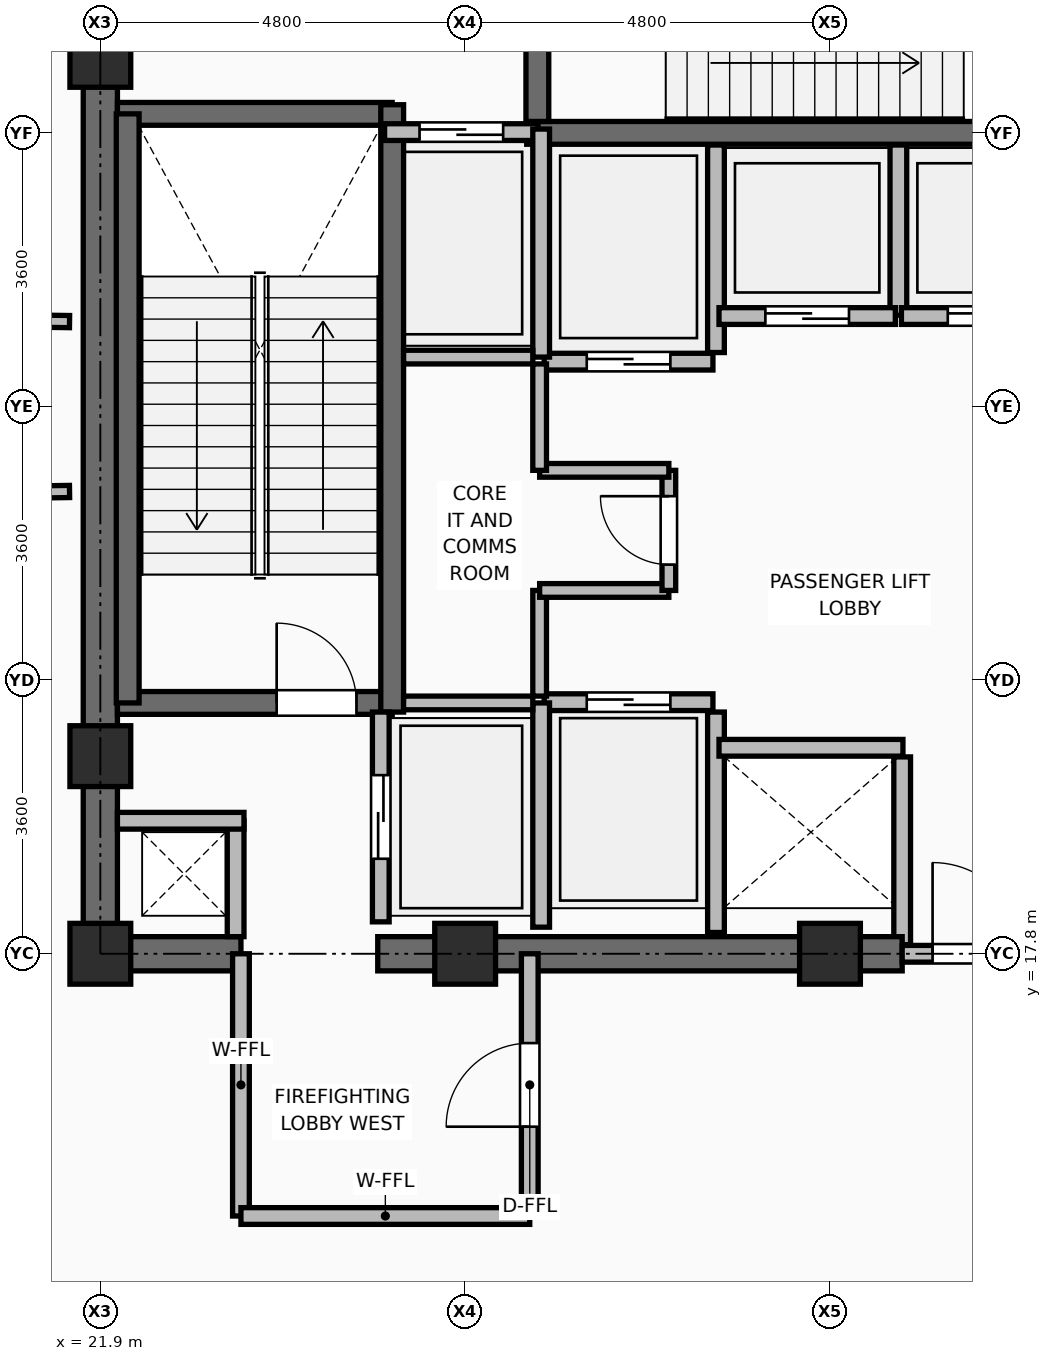
"""IFC4 building model, lengths in metres.
Left out: names, types, materials, properties, quantities, classifications, styles, units other than length and angle.
Written with IfcOpenShell. Run it as: python <this file> out.ifc"""

import sys

from ifc_helpers import new_model, si_unit, direction, frame, frame_2d, origin, origin_2d, place, context, subcontext, project, spatial, rectangle, extrude, element, fill, save


model = new_model("IFC4")
c1 = context("Model", 3, precision=1e-05, world=origin(), true_north=direction((0.0, 1.0)))
c2 = subcontext(c1, "Body", "Model", "MODEL_VIEW")
j1 = project(units=[si_unit("LENGTHUNIT", "METRE"), si_unit("PLANEANGLEUNIT", "RADIAN")], contexts=[c1])
p1 = place(None, origin())
s1 = spatial("IfcSite", under=j1, at=p1, CompositionType="ELEMENT")
p2 = place(p1, origin())
s2 = spatial("IfcBuilding", under=s1, at=p2, CompositionType="ELEMENT")
p3 = place(p2, frame((0.0, 0.0, 253.65)))
s3 = spatial("IfcBuildingStorey", under=s2, at=p3, CompositionType="ELEMENT", Elevation=253.65)
for number, where, z_axis, x_axis in (
    (1, (21.9, 17.8, 0.0), (0.0, 0.0, 1.0), (1.0, 0.0, 0.0)),
    (2, (26.7, 17.8, 0.0), (0.0, 0.0, 1.0), (1.0, 0.0, 0.0)),
    (3, (31.5, 17.8, 0.0), (0.0, 0.0, 1.0), (1.0, 0.0, 0.0)),
    (4, (21.9, 20.4, 0.0), (0.0, 0.0, 1.0), (1.0, 0.0, 0.0)),
    (5, (21.9, 29.6, 0.0), (0.0, 0.0, 1.0), (1.0, 0.0, 0.0)),
):
    element("IfcColumn", number, at=place(p3, frame(where, z_axis=z_axis, x_axis=x_axis)), inside=s3, PredefinedType="COLUMN", context=c2, shape_type="SweptSolid", body=[
        extrude(rectangle(XDim=0.8, YDim=0.8, at=origin_2d()), origin(), (0.0, 0.0, 1.0), 5.4),
    ])
p4 = place(p3, frame((30.0, 18.08, 0.0), z_axis=(0.0, 0.0, 1.0), x_axis=(0.0, 1.0, 0.0)))
e6 = element("IfcWall", 6, at=p4, inside=s3, PredefinedType="PARTITIONING", context=c2, shape_type="SweptSolid", body=[
    extrude(rectangle(XDim=2.9, YDim=0.22, at=frame_2d((1.45, 0.0))), origin(), (0.0, 0.0, 1.0), 5.195),
])
p5 = place(p3, frame((32.45, 17.92, 0.0), z_axis=(0.0, 0.0, 1.0), x_axis=(0.0, 1.0, 0.0)))
e7 = element("IfcWall", 7, at=p5, inside=s3, PredefinedType="PARTITIONING", context=c2, shape_type="SweptSolid", body=[
    extrude(rectangle(XDim=2.47, YDim=0.22, at=frame_2d((1.235, 0.0))), origin(), (0.0, 0.0, 1.0), 5.195),
])
p6 = place(p3, frame((30.0, 25.71, 0.0), z_axis=(0.0, 0.0, 1.0), x_axis=(0.0, 1.0, 0.0)))
e8 = element("IfcWall", 8, at=p6, inside=s3, PredefinedType="PARTITIONING", context=c2, shape_type="SweptSolid", body=[
    extrude(rectangle(XDim=2.73, YDim=0.22, at=frame_2d((1.365, 0.0))), origin(), (0.0, 0.0, 1.0), 5.195),
])
p7 = place(p3, frame((32.4, 26.2, 0.0), z_axis=(0.0, 0.0, 1.0), x_axis=(0.0, 1.0, 0.0)))
e9 = element("IfcWall", 9, at=p7, inside=s3, PredefinedType="PARTITIONING", context=c2, shape_type="SweptSolid", body=[
    extrude(rectangle(XDim=2.24, YDim=0.22, at=frame_2d((1.12, 0.0))), origin(), (0.0, 0.0, 1.0), 5.195),
])
p8 = place(p3, frame((21.675, 17.8, 0.0), z_axis=(0.0, 0.0, 1.0), x_axis=(1.0, 0.0, 0.0)))
e10 = element("IfcWall", 10, at=p8, inside=s3, PredefinedType="SHEAR", context=c2, shape_type="SweptSolid", body=[
    extrude(rectangle(XDim=2.075, YDim=0.45, at=frame_2d((1.038, 0.0))), origin(), (0.0, 0.0, 1.0), 5.22),
])
p9 = place(p3, frame((25.55, 17.8, 0.0), z_axis=(0.0, 0.0, 1.0), x_axis=(1.0, 0.0, 0.0)))
e11 = element("IfcWall", 11, at=p9, inside=s3, PredefinedType="SHEAR", context=c2, shape_type="SweptSolid", body=[
    extrude(rectangle(XDim=6.9, YDim=0.45, at=frame_2d((3.45, 0.0))), origin(), (0.0, 0.0, 1.0), 5.22),
])
p10 = place(p3, frame((32.45, 17.8, 0.0), z_axis=(0.0, 0.0, 1.0), x_axis=(1.0, 0.0, 0.0)))
e12 = element("IfcWall", 12, at=p10, inside=s3, PredefinedType="PARTITIONING", context=c2, shape_type="SweptSolid", body=[
    extrude(rectangle(XDim=2.5, YDim=0.22, at=frame_2d((1.25, 0.0))), origin(), (0.0, 0.0, 1.0), 4.733),
])
p11 = place(p10, frame((0.4, 0.0, 0.0)))
e13 = element("IfcOpeningElement", 13, at=p11, cuts=e12, PredefinedType="OPENING", context=c2, shape_type="SweptSolid", body=[
    extrude(rectangle(XDim=1.2, YDim=2.1, at=frame_2d((0.6, 1.05))), frame((0.0, 0.12, 0.0), z_axis=(0.0, -1.0, 0.0), x_axis=(1.0, 0.0, 0.0)), (0.0, 0.0, 1.0), 0.24),
])
p12 = place(p3, frame((21.9, 18.025, 0.0), z_axis=(0.0, 0.0, 1.0), x_axis=(0.0, 1.0, 0.0)))
e14 = element("IfcWall", 14, at=p12, inside=s3, PredefinedType="SHEAR", context=c2, shape_type="SweptSolid", body=[
    extrude(rectangle(XDim=14.2, YDim=0.45, at=frame_2d((7.1, 0.0))), origin(), (0.0, 0.0, 1.0), 5.22),
])
p13 = place(p3, frame((22.125, 21.1, 0.0), z_axis=(0.0, 0.0, 1.0), x_axis=(1.0, 0.0, 0.0)))
e15 = element("IfcWall", 15, at=p13, inside=s3, PredefinedType="SHEAR", context=c2, shape_type="SweptSolid", body=[
    extrude(rectangle(XDim=3.615, YDim=0.3, at=frame_2d((1.808, 0.0))), origin(), (0.0, 0.0, 1.0), 5.22),
])
p14 = place(p13, frame((2.095, 0.0, 0.0)))
e16 = element("IfcOpeningElement", 16, at=p14, cuts=e15, PredefinedType="OPENING", context=c2, shape_type="SweptSolid", body=[
    extrude(rectangle(XDim=1.05, YDim=2.1, at=frame_2d((0.525, 1.05))), frame((0.0, 0.16, 0.0), z_axis=(0.0, -1.0, 0.0), x_axis=(1.0, 0.0, 0.0)), (0.0, 0.0, 1.0), 0.32),
])
p15 = place(p3, frame((22.125, 28.85, 0.0), z_axis=(0.0, 0.0, 1.0), x_axis=(1.0, 0.0, 0.0)))
e17 = element("IfcWall", 17, at=p15, inside=s3, PredefinedType="SHEAR", context=c2, shape_type="SweptSolid", body=[
    extrude(rectangle(XDim=3.615, YDim=0.3, at=frame_2d((1.808, 0.0))), origin(), (0.0, 0.0, 1.0), 5.22),
])
p16 = place(p3, frame((25.74, 20.98, 0.0), z_axis=(0.0, 0.0, 1.0), x_axis=(0.0, 1.0, 0.0)))
e18 = element("IfcWall", 18, at=p16, inside=s3, PredefinedType="SHEAR", context=c2, shape_type="SweptSolid", body=[
    extrude(rectangle(XDim=7.99, YDim=0.3, at=frame_2d((3.995, 0.0))), origin(), (0.0, 0.0, 1.0), 5.22),
])
p17 = place(p3, frame((22.26, 21.1, 0.0), z_axis=(0.0, 0.0, 1.0), x_axis=(0.0, 1.0, 0.0)))
e19 = element("IfcWall", 19, at=p17, inside=s3, PredefinedType="SHEAR", context=c2, shape_type="SweptSolid", body=[
    extrude(rectangle(XDim=7.75, YDim=0.3, at=frame_2d((3.875, 0.0))), origin(), (0.0, 0.0, 1.0), 5.22),
])
p18 = place(p3, frame((27.51, 28.6, 0.0), z_axis=(0.0, 0.0, 1.0), x_axis=(1.0, 0.0, 0.0)))
e20 = element("IfcWall", 20, at=p18, inside=s3, PredefinedType="SHEAR", context=c2, shape_type="SweptSolid", body=[
    extrude(rectangle(XDim=8.03, YDim=0.3, at=frame_2d((4.015, 0.0))), origin(), (0.0, 0.0, 1.0), 5.22),
])
p19 = place(p3, frame((27.65, 28.75, 0.0), z_axis=(0.0, 0.0, 1.0), x_axis=(0.0, 1.0, 0.0)))
e21 = element("IfcWall", 21, at=p19, inside=s3, PredefinedType="SHEAR", context=c2, shape_type="SweptSolid", body=[
    extrude(rectangle(XDim=3.475, YDim=0.3, at=frame_2d((1.738, 0.0))), origin(), (0.0, 0.0, 1.0), 5.22),
])
p20 = place(p19, frame((1.0, 0.0, 0.0)))
e22 = element("IfcOpeningElement", 22, at=p20, cuts=e21, PredefinedType="OPENING", context=c2, shape_type="SweptSolid", body=[
    extrude(rectangle(XDim=1.05, YDim=2.1, at=frame_2d((0.525, 1.05))), frame((0.0, 0.16, 0.0), z_axis=(0.0, -1.0, 0.0), x_axis=(1.0, 0.0, 0.0)), (0.0, 0.0, 1.0), 0.32),
])
p21 = place(p3, frame((23.68, 18.025, 0.0), z_axis=(0.0, 0.0, 1.0), x_axis=(0.0, 1.0, 0.0)))
e23 = element("IfcWall", 23, at=p21, inside=s3, PredefinedType="PARTITIONING", context=c2, shape_type="SweptSolid", body=[
    extrude(rectangle(XDim=1.525, YDim=0.22, at=frame_2d((0.763, 0.0))), origin(), (0.0, 0.0, 1.0), 5.2),
])
p22 = place(p3, frame((22.125, 19.55, 0.0), z_axis=(0.0, 0.0, 1.0), x_axis=(1.0, 0.0, 0.0)))
e24 = element("IfcWall", 24, at=p22, inside=s3, PredefinedType="PARTITIONING", context=c2, shape_type="SweptSolid", body=[
    extrude(rectangle(XDim=1.665, YDim=0.22, at=frame_2d((0.833, 0.0))), origin(), (0.0, 0.0, 1.0), 4.245),
])
p23 = place(p3, frame((25.59, 18.22, 0.0), z_axis=(0.0, 0.0, 1.0), x_axis=(0.0, 1.0, 0.0)))
e25 = element("IfcWall", 25, at=p23, inside=s3, PredefinedType="PARTITIONING", context=c2, shape_type="SweptSolid", body=[
    extrude(rectangle(XDim=2.76, YDim=0.22, at=frame_2d((1.38, 0.0))), origin(), (0.0, 0.0, 1.0), 5.2),
])
p24 = place(p23, frame((0.83, 0.0, 0.0)))
e26 = element("IfcOpeningElement", 26, at=p24, cuts=e25, PredefinedType="OPENING", context=c2, shape_type="SweptSolid", body=[
    extrude(rectangle(XDim=1.1, YDim=2.2, at=frame_2d((0.55, 1.1))), frame((0.0, 0.12, 0.0), z_axis=(0.0, -1.0, 0.0), x_axis=(1.0, 0.0, 0.0)), (0.0, 0.0, 1.0), 0.24),
])
p25 = place(p3, frame((25.64, 28.61, 0.0), z_axis=(0.0, 0.0, 1.0), x_axis=(1.0, 0.0, 0.0)))
e27 = element("IfcWall", 27, at=p25, inside=s3, PredefinedType="PARTITIONING", context=c2, shape_type="SweptSolid", body=[
    extrude(rectangle(XDim=2.02, YDim=0.22, at=frame_2d((1.01, 0.0))), origin(), (0.0, 0.0, 1.0), 5.2),
])
p26 = place(p25, frame((0.46, 0.0, 0.0)))
e28 = element("IfcOpeningElement", 28, at=p26, cuts=e27, PredefinedType="OPENING", context=c2, shape_type="SweptSolid", body=[
    extrude(rectangle(XDim=1.1, YDim=2.2, at=frame_2d((0.55, 1.1))), frame((0.0, 0.12, 0.0), z_axis=(0.0, -1.0, 0.0), x_axis=(1.0, 0.0, 0.0)), (0.0, 0.0, 1.0), 0.24),
])
p27 = place(p3, frame((27.74, 21.11, 0.0), z_axis=(0.0, 0.0, 1.0), x_axis=(1.0, 0.0, 0.0)))
e29 = element("IfcWall", 29, at=p27, inside=s3, PredefinedType="PARTITIONING", context=c2, shape_type="SweptSolid", body=[
    extrude(rectangle(XDim=2.22, YDim=0.22, at=frame_2d((1.11, 0.0))), origin(), (0.0, 0.0, 1.0), 5.2),
])
p28 = place(p27, frame((0.56, 0.0, 0.0)))
e30 = element("IfcOpeningElement", 30, at=p28, cuts=e29, PredefinedType="OPENING", context=c2, shape_type="SweptSolid", body=[
    extrude(rectangle(XDim=1.1, YDim=2.2, at=frame_2d((0.55, 1.1))), frame((0.0, 0.12, 0.0), z_axis=(0.0, -1.0, 0.0), x_axis=(1.0, 0.0, 0.0)), (0.0, 0.0, 1.0), 0.24),
])
p29 = place(p3, frame((27.74, 25.59, 0.0), z_axis=(0.0, 0.0, 1.0), x_axis=(1.0, 0.0, 0.0)))
e31 = element("IfcWall", 31, at=p29, inside=s3, PredefinedType="PARTITIONING", context=c2, shape_type="SweptSolid", body=[
    extrude(rectangle(XDim=2.22, YDim=0.22, at=frame_2d((1.11, 0.0))), origin(), (0.0, 0.0, 1.0), 5.2),
])
p30 = place(p29, frame((0.56, 0.0, 0.0)))
e32 = element("IfcOpeningElement", 32, at=p30, cuts=e31, PredefinedType="OPENING", context=c2, shape_type="SweptSolid", body=[
    extrude(rectangle(XDim=1.1, YDim=2.2, at=frame_2d((0.55, 1.1))), frame((0.0, 0.12, 0.0), z_axis=(0.0, -1.0, 0.0), x_axis=(1.0, 0.0, 0.0)), (0.0, 0.0, 1.0), 0.24),
])
p31 = place(p3, frame((30.04, 20.51, 0.0), z_axis=(0.0, 0.0, 1.0), x_axis=(1.0, 0.0, 0.0)))
e33 = element("IfcWall", 33, at=p31, inside=s3, PredefinedType="PARTITIONING", context=c2, shape_type="SweptSolid", body=[
    extrude(rectangle(XDim=2.42, YDim=0.22, at=frame_2d((1.21, 0.0))), origin(), (0.0, 0.0, 1.0), 5.2),
])
p32 = place(p3, frame((30.04, 26.19, 0.0), z_axis=(0.0, 0.0, 1.0), x_axis=(1.0, 0.0, 0.0)))
e34 = element("IfcWall", 34, at=p32, inside=s3, PredefinedType="PARTITIONING", context=c2, shape_type="SweptSolid", body=[
    extrude(rectangle(XDim=2.32, YDim=0.22, at=frame_2d((1.16, 0.0))), origin(), (0.0, 0.0, 1.0), 5.2),
])
p33 = place(p32, frame((0.61, 0.0, 0.0)))
e35 = element("IfcOpeningElement", 35, at=p33, cuts=e34, PredefinedType="OPENING", context=c2, shape_type="SweptSolid", body=[
    extrude(rectangle(XDim=1.1, YDim=2.2, at=frame_2d((0.55, 1.1))), frame((0.0, 0.12, 0.0), z_axis=(0.0, -1.0, 0.0), x_axis=(1.0, 0.0, 0.0)), (0.0, 0.0, 1.0), 0.24),
])
p34 = place(p3, frame((32.44, 26.19, 0.0), z_axis=(0.0, 0.0, 1.0), x_axis=(1.0, 0.0, 0.0)))
e36 = element("IfcWall", 36, at=p34, inside=s3, PredefinedType="PARTITIONING", context=c2, shape_type="SweptSolid", body=[
    extrude(rectangle(XDim=2.32, YDim=0.22, at=frame_2d((1.16, 0.0))), origin(), (0.0, 0.0, 1.0), 5.2),
])
p35 = place(p34, frame((0.61, 0.0, 0.0)))
e37 = element("IfcOpeningElement", 37, at=p35, cuts=e36, PredefinedType="OPENING", context=c2, shape_type="SweptSolid", body=[
    extrude(rectangle(XDim=1.1, YDim=2.2, at=frame_2d((0.55, 1.1))), frame((0.0, 0.12, 0.0), z_axis=(0.0, -1.0, 0.0), x_axis=(1.0, 0.0, 0.0)), (0.0, 0.0, 1.0), 0.24),
])
p36 = place(p3, frame((27.7, 18.15, 0.0), z_axis=(0.0, 0.0, 1.0), x_axis=(0.0, 1.0, 0.0)))
e38 = element("IfcWall", 38, at=p36, inside=s3, PredefinedType="PARTITIONING", context=c2, shape_type="SweptSolid", body=[
    extrude(rectangle(XDim=2.95, YDim=0.22, at=frame_2d((1.475, 0.0))), origin(), (0.0, 0.0, 1.0), 5.2),
])
p37 = place(p3, frame((27.7, 25.65, 0.0), z_axis=(0.0, 0.0, 1.0), x_axis=(0.0, 1.0, 0.0)))
e39 = element("IfcWall", 39, at=p37, inside=s3, PredefinedType="PARTITIONING", context=c2, shape_type="SweptSolid", body=[
    extrude(rectangle(XDim=3.0, YDim=0.22, at=frame_2d((1.5, 0.0))), origin(), (0.0, 0.0, 1.0), 5.2),
])
for number, where, z_axis, x_axis in (
    (40, (25.89, 21.1, 0.0), (0.0, 0.0, 1.0), (1.0, 0.0, 0.0)),
    (41, (25.89, 25.65, 0.0), (0.0, 0.0, 1.0), (1.0, 0.0, 0.0)),
):
    element("IfcWall", number, at=place(p3, frame(where, z_axis=z_axis, x_axis=x_axis)), inside=s3, PredefinedType="PARTITIONING", context=c2, shape_type="SweptSolid", body=[
        extrude(rectangle(XDim=1.7, YDim=0.18, at=frame_2d((0.85, 0.0))), origin(), (0.0, 0.0, 1.0), 5.2),
    ])
p38 = place(p3, frame((27.68, 21.19, 0.0), z_axis=(0.0, 0.0, 1.0), x_axis=(0.0, 1.0, 0.0)))
e42 = element("IfcWall", 42, at=p38, inside=s3, PredefinedType="PARTITIONING", context=c2, shape_type="SweptSolid", body=[
    extrude(rectangle(XDim=1.39, YDim=0.18, at=frame_2d((0.695, 0.0))), origin(), (0.0, 0.0, 1.0), 5.2),
])
p39 = place(p3, frame((27.68, 22.58, 0.0), z_axis=(0.0, 0.0, 1.0), x_axis=(1.0, 0.0, 0.0)))
e43 = element("IfcWall", 43, at=p39, inside=s3, PredefinedType="PARTITIONING", context=c2, shape_type="SweptSolid", body=[
    extrude(rectangle(XDim=1.7, YDim=0.18, at=frame_2d((0.85, 0.0))), origin(), (0.0, 0.0, 1.0), 5.2),
])
p40 = place(p3, frame((29.38, 22.58, 0.0), z_axis=(0.0, 0.0, 1.0), x_axis=(0.0, 1.0, 0.0)))
e44 = element("IfcWall", 44, at=p40, inside=s3, PredefinedType="PARTITIONING", context=c2, shape_type="SweptSolid", body=[
    extrude(rectangle(XDim=1.58, YDim=0.18, at=frame_2d((0.79, 0.0))), origin(), (0.0, 0.0, 1.0), 5.2),
])
p41 = place(p40, frame((0.34, 0.0, 0.0)))
e45 = element("IfcOpeningElement", 45, at=p41, cuts=e44, PredefinedType="OPENING", context=c2, shape_type="SweptSolid", body=[
    extrude(rectangle(XDim=0.9, YDim=2.1, at=frame_2d((0.45, 1.05))), frame((0.0, 0.1, 0.0), z_axis=(0.0, -1.0, 0.0), x_axis=(1.0, 0.0, 0.0)), (0.0, 0.0, 1.0), 0.2),
])
p42 = place(p3, frame((27.68, 24.16, 0.0), z_axis=(0.0, 0.0, 1.0), x_axis=(1.0, 0.0, 0.0)))
e46 = element("IfcWall", 46, at=p42, inside=s3, PredefinedType="PARTITIONING", context=c2, shape_type="SweptSolid", body=[
    extrude(rectangle(XDim=1.7, YDim=0.18, at=frame_2d((0.85, 0.0))), origin(), (0.0, 0.0, 1.0), 5.2),
])
p43 = place(p3, frame((27.68, 24.16, 0.0), z_axis=(0.0, 0.0, 1.0), x_axis=(0.0, 1.0, 0.0)))
e47 = element("IfcWall", 47, at=p43, inside=s3, PredefinedType="PARTITIONING", context=c2, shape_type="SweptSolid", body=[
    extrude(rectangle(XDim=1.4, YDim=0.18, at=frame_2d((0.7, 0.0))), origin(), (0.0, 0.0, 1.0), 5.2),
])
p44 = place(p3, frame((23.75, 14.35, 0.0), z_axis=(0.0, 0.0, 1.0), x_axis=(0.0, 1.0, 0.0)))
e48 = element("IfcWall", 48, at=p44, inside=s3, PredefinedType="PARTITIONING", context=c2, shape_type="SweptSolid", body=[
    extrude(rectangle(XDim=3.45, YDim=0.22, at=frame_2d((1.725, 0.0))), origin(), (0.0, 0.0, 1.0), 4.733),
])
p45 = place(p3, frame((23.75, 14.35, 0.0), z_axis=(0.0, 0.0, 1.0), x_axis=(1.0, 0.0, 0.0)))
e49 = element("IfcWall", 49, at=p45, inside=s3, PredefinedType="PARTITIONING", context=c2, shape_type="SweptSolid", body=[
    extrude(rectangle(XDim=3.8, YDim=0.22, at=frame_2d((1.9, 0.0))), origin(), (0.0, 0.0, 1.0), 5.2),
])
p46 = place(p3, frame((27.55, 14.35, 0.0), z_axis=(0.0, 0.0, 1.0), x_axis=(0.0, 1.0, 0.0)))
e50 = element("IfcWall", 50, at=p46, inside=s3, PredefinedType="PARTITIONING", context=c2, shape_type="SweptSolid", body=[
    extrude(rectangle(XDim=3.45, YDim=0.22, at=frame_2d((1.725, 0.0))), origin(), (0.0, 0.0, 1.0), 4.733),
])
p47 = place(p46, frame((1.175, 0.0, 0.0)))
e51 = element("IfcOpeningElement", 51, at=p47, cuts=e50, PredefinedType="OPENING", context=c2, shape_type="SweptSolid", body=[
    extrude(rectangle(XDim=1.1, YDim=2.1, at=frame_2d((0.55, 1.05))), frame((0.0, 0.12, 0.0), z_axis=(0.0, -1.0, 0.0), x_axis=(1.0, 0.0, 0.0)), (0.0, 0.0, 1.0), 0.24),
])
p48 = place(p3, frame((21.495, 26.117, 0.0), z_axis=(0.0, 0.0, 1.0), x_axis=(-0.999908537082, 0.013524698532, 0.0)))
e52 = element("IfcWall", 52, at=p48, inside=s3, PredefinedType="PARTITIONING", context=c2, shape_type="SweptSolid", body=[
    extrude(rectangle(XDim=1.859, YDim=0.16, at=frame_2d((0.93, 0.0))), origin(), (0.0, 0.0, 1.0), 4.245),
])
p49 = place(p3, frame((19.635, 23.854, 0.0), z_axis=(0.0, 0.0, 1.0), x_axis=(0.999886107392, 0.015092125259, 0.0)))
e53 = element("IfcWall", 53, at=p49, inside=s3, PredefinedType="PARTITIONING", context=c2, shape_type="SweptSolid", body=[
    extrude(rectangle(XDim=1.86, YDim=0.16, at=frame_2d((0.93, 0.0))), origin(), (0.0, 0.0, 1.0), 4.245),
])
p50 = place(p11, origin())
e54 = element("IfcDoor", 54, at=p50, inside=s3, OperationType="SINGLE_SWING_LEFT", PredefinedType="DOOR", context=c2, shape_type="SweptSolid", body=[
    extrude(rectangle(XDim=1.2, YDim=2.1, at=frame_2d((0.6, 1.05))), frame((0.0, 0.025, 0.0), z_axis=(0.0, -1.0, 0.0), x_axis=(1.0, 0.0, 0.0)), (0.0, 0.0, 1.0), 0.05),
])
fill(e13, e54)
p51 = place(p14, origin())
e55 = element("IfcDoor", 55, at=p51, inside=s3, OperationType="SINGLE_SWING_LEFT", PredefinedType="DOOR", context=c2, shape_type="SweptSolid", body=[
    extrude(rectangle(XDim=1.05, YDim=2.1, at=frame_2d((0.525, 1.05))), frame((0.0, 0.025, 0.0), z_axis=(0.0, -1.0, 0.0), x_axis=(1.0, 0.0, 0.0)), (0.0, 0.0, 1.0), 0.05),
])
fill(e16, e55)
p52 = place(p24, origin())
e56 = element("IfcDoor", 56, at=p52, inside=s3, OperationType="DOUBLE_DOOR_SLIDING", PredefinedType="DOOR", context=c2, shape_type="SweptSolid", body=[
    extrude(rectangle(XDim=1.1, YDim=2.2, at=frame_2d((0.55, 1.1))), frame((0.0, 0.025, 0.0), z_axis=(0.0, -1.0, 0.0), x_axis=(1.0, 0.0, 0.0)), (0.0, 0.0, 1.0), 0.05),
])
fill(e26, e56)
p53 = place(p26, origin())
e57 = element("IfcDoor", 57, at=p53, inside=s3, OperationType="DOUBLE_DOOR_SLIDING", PredefinedType="DOOR", context=c2, shape_type="SweptSolid", body=[
    extrude(rectangle(XDim=1.1, YDim=2.2, at=frame_2d((0.55, 1.1))), frame((0.0, 0.025, 0.0), z_axis=(0.0, -1.0, 0.0), x_axis=(1.0, 0.0, 0.0)), (0.0, 0.0, 1.0), 0.05),
])
fill(e28, e57)
p54 = place(p28, origin())
e58 = element("IfcDoor", 58, at=p54, inside=s3, OperationType="DOUBLE_DOOR_SLIDING", PredefinedType="DOOR", context=c2, shape_type="SweptSolid", body=[
    extrude(rectangle(XDim=1.1, YDim=2.2, at=frame_2d((0.55, 1.1))), frame((0.0, 0.025, 0.0), z_axis=(0.0, -1.0, 0.0), x_axis=(1.0, 0.0, 0.0)), (0.0, 0.0, 1.0), 0.05),
])
fill(e30, e58)
p55 = place(p30, frame((1.1, 0.0, 0.0), z_axis=(0.0, 0.0, 1.0), x_axis=(-1.0, 0.0, 0.0)))
e59 = element("IfcDoor", 59, at=p55, inside=s3, OperationType="DOUBLE_DOOR_SLIDING", PredefinedType="DOOR", context=c2, shape_type="SweptSolid", body=[
    extrude(rectangle(XDim=1.1, YDim=2.2, at=frame_2d((0.55, 1.1))), frame((0.0, 0.025, 0.0), z_axis=(0.0, -1.0, 0.0), x_axis=(1.0, 0.0, 0.0)), (0.0, 0.0, 1.0), 0.05),
])
fill(e32, e59)
p56 = place(p33, frame((1.1, 0.0, 0.0), z_axis=(0.0, 0.0, 1.0), x_axis=(-1.0, 0.0, 0.0)))
e60 = element("IfcDoor", 60, at=p56, inside=s3, OperationType="DOUBLE_DOOR_SLIDING", PredefinedType="DOOR", context=c2, shape_type="SweptSolid", body=[
    extrude(rectangle(XDim=1.1, YDim=2.2, at=frame_2d((0.55, 1.1))), frame((0.0, 0.025, 0.0), z_axis=(0.0, -1.0, 0.0), x_axis=(1.0, 0.0, 0.0)), (0.0, 0.0, 1.0), 0.05),
])
fill(e35, e60)
p57 = place(p35, frame((1.1, 0.0, 0.0), z_axis=(0.0, 0.0, 1.0), x_axis=(-1.0, 0.0, 0.0)))
e61 = element("IfcDoor", 61, at=p57, inside=s3, OperationType="DOUBLE_DOOR_SLIDING", PredefinedType="DOOR", context=c2, shape_type="SweptSolid", body=[
    extrude(rectangle(XDim=1.1, YDim=2.2, at=frame_2d((0.55, 1.1))), frame((0.0, 0.025, 0.0), z_axis=(0.0, -1.0, 0.0), x_axis=(1.0, 0.0, 0.0)), (0.0, 0.0, 1.0), 0.05),
])
fill(e37, e61)
p58 = place(p41, origin())
e62 = element("IfcDoor", 62, at=p58, inside=s3, OperationType="SINGLE_SWING_RIGHT", PredefinedType="DOOR", context=c2, shape_type="SweptSolid", body=[
    extrude(rectangle(XDim=0.9, YDim=2.1, at=frame_2d((0.45, 1.05))), frame((0.0, 0.025, 0.0), z_axis=(0.0, -1.0, 0.0), x_axis=(1.0, 0.0, 0.0)), (0.0, 0.0, 1.0), 0.05),
])
fill(e45, e62)
p59 = place(p47, origin())
e63 = element("IfcDoor", 63, at=p59, inside=s3, OperationType="SINGLE_SWING_LEFT", PredefinedType="DOOR", context=c2, shape_type="SweptSolid", body=[
    extrude(rectangle(XDim=1.1, YDim=2.1, at=frame_2d((0.55, 1.05))), frame((0.0, 0.025, 0.0), z_axis=(0.0, -1.0, 0.0), x_axis=(1.0, 0.0, 0.0)), (0.0, 0.0, 1.0), 0.05),
])
fill(e51, e63)
save(model, sys.argv[1])
